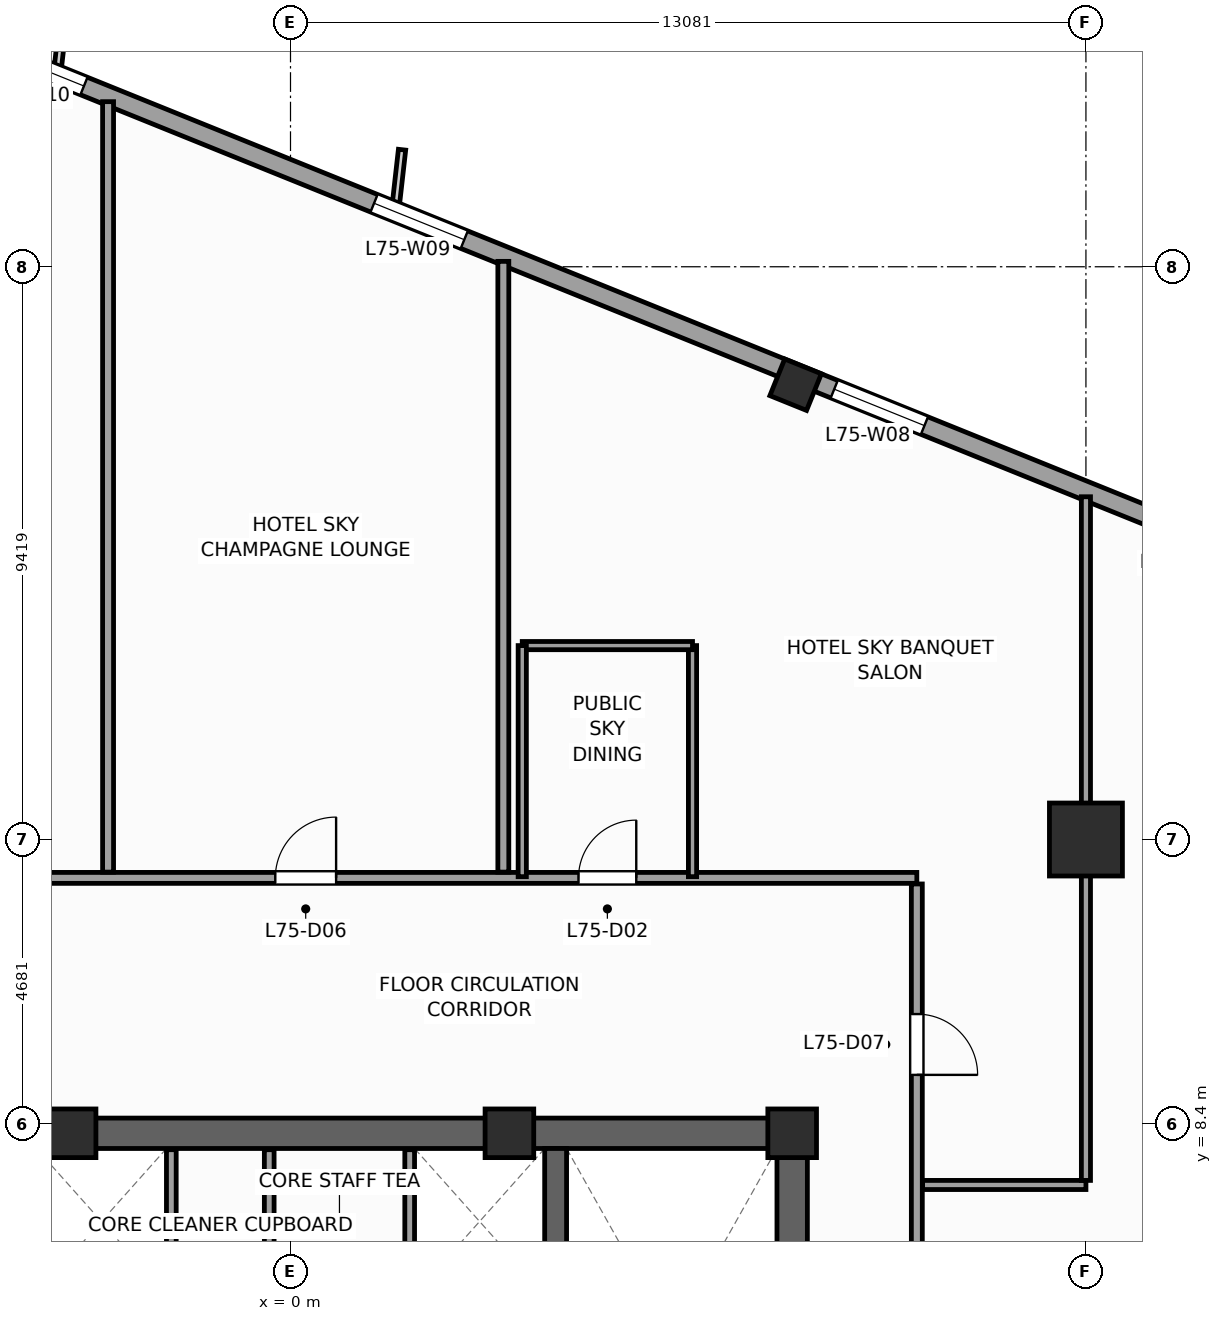
"""IFC4 building model, lengths in metres.
Left out: names, types, materials, properties, quantities, classifications, styles, units other than length and angle.
Written with IfcOpenShell. Run it as: python <this file> out.ifc"""

import sys

from ifc_helpers import new_model, si_unit, direction, frame, frame_2d, origin, origin_2d, place, context, subcontext, project, spatial, rectangle, extrude, source, transform, mapped, element, fill, save


model = new_model("IFC4")
c1 = context("Model", 3, precision=1e-05, world=origin(), true_north=direction((0.0, 1.0)))
c2 = subcontext(c1, "Body", "Model", "MODEL_VIEW")
j1 = project(units=[si_unit("LENGTHUNIT", "METRE"), si_unit("PLANEANGLEUNIT", "RADIAN")], contexts=[c1])
p1 = place(None, origin())
s1 = spatial("IfcSite", under=j1, at=p1, CompositionType="ELEMENT")
p2 = place(p1, origin())
s2 = spatial("IfcBuilding", under=s1, at=p2, CompositionType="ELEMENT")
p3 = place(p2, frame((0.0, 0.0, 304.8)))
s3 = spatial("IfcBuildingStorey", under=s2, at=p3, CompositionType="ELEMENT", Elevation=304.8)
p4 = place(p3, frame((-8.5, 8.25, 0.0), z_axis=(0.0, 0.0, 1.0), x_axis=(1.0, 0.0, 0.0)))
e1 = element("IfcWall", 1, at=p4, inside=s3, PredefinedType="SHEAR", context=c2, shape_type="SweptSolid", body=[
    extrude(rectangle(XDim=17.0, YDim=0.5, at=frame_2d((8.5, 0.0))), origin(), (0.0, 0.0, 1.0), 3.6),
])
p5 = place(p3, frame((8.25, -8.0, 0.0), z_axis=(0.0, 0.0, 1.0), x_axis=(0.0, 1.0, 0.0)))
e2 = element("IfcWall", 2, at=p5, inside=s3, PredefinedType="SHEAR", context=c2, shape_type="SweptSolid", body=[
    extrude(rectangle(XDim=16.0, YDim=0.5, at=frame_2d((8.0, 0.0))), origin(), (0.0, 0.0, 1.0), 3.6),
])
p6 = place(p5, frame((4.69, 0.0, 0.0)))
e3 = element("IfcOpeningElement", 3, at=p6, cuts=e2, PredefinedType="OPENING", context=c2, shape_type="SweptSolid", body=[
    extrude(rectangle(XDim=1.3, YDim=2.2, at=frame_2d((0.65, 1.1))), frame((0.0, 0.26, 0.0), z_axis=(0.0, -1.0, 0.0), x_axis=(1.0, 0.0, 0.0)), (0.0, 0.0, 1.0), 0.52),
])
p7 = place(p3, frame((4.36, -8.0, 0.0), z_axis=(0.0, 0.0, 1.0), x_axis=(0.0, 1.0, 0.0)))
e4 = element("IfcWall", 4, at=p7, inside=s3, PredefinedType="SHEAR", context=c2, shape_type="SweptSolid", body=[
    extrude(rectangle(XDim=16.0, YDim=0.36, at=frame_2d((8.0, 0.0))), origin(), (0.0, 0.0, 1.0), 3.6),
])
m1 = source(origin(), c2, "Body", "SweptSolid", [
    extrude(rectangle(XDim=0.8, YDim=0.8, at=origin_2d()), origin(), (0.0, 0.0, 1.0), 3.6),
])
for number, where, z_axis, x_axis in (
    (5, (8.25, 8.25, 0.0), (0.0, 0.0, 1.0), (1.0, 0.0, 0.0)),
    (6, (-3.6, 8.25, 0.0), (0.0, 0.0, 1.0), (1.0, 0.0, 0.0)),
    (7, (3.6, 8.25, 0.0), (0.0, 0.0, 1.0), (1.0, 0.0, 0.0)),
):
    element("IfcColumn", number, at=place(p3, frame(where, z_axis=z_axis, x_axis=x_axis)), inside=s3, PredefinedType="PILASTER", context=c2, shape_type="MappedRepresentation", body=[
        mapped(m1, transform((0.0, 0.0, 0.0), scale=1.0)),
    ])
m2 = source(origin(), c2, "Body", "SweptSolid", [
    extrude(rectangle(XDim=1.2, YDim=1.2, at=origin_2d()), origin(), (0.0, 0.0, 1.0), 3.6),
])
p8 = place(p3, frame((13.081, 13.081, 0.0), z_axis=(0.0, 0.0, 1.0), x_axis=(1.0, 0.0, 0.0)))
e8 = element("IfcColumn", 8, at=p8, inside=s3, PredefinedType="COLUMN", context=c2, shape_type="MappedRepresentation", body=[
    mapped(m2, transform((0.0, 0.0, 0.0), scale=1.0)),
])
m3 = source(origin(), c2, "Body", "SweptSolid", [
    extrude(rectangle(XDim=0.65, YDim=0.65, at=origin_2d()), origin(), (0.0, 0.0, 1.0), 3.6),
])
p9 = place(p3, frame((8.307, 20.56, 0.0), z_axis=(0.0, 0.0, 1.0), x_axis=(0.374606593416, 0.927183854567, 0.0)))
e9 = element("IfcColumn", 9, at=p9, inside=s3, PredefinedType="COLUMN", context=c2, shape_type="MappedRepresentation", body=[
    mapped(m3, transform((0.0, 0.0, 0.0), scale=1.0)),
])
p10 = place(p3, frame((23.813, 14.479, 0.0), z_axis=(0.0, 0.0, 1.0), x_axis=(-0.927182657188, 0.374609557019, 0.0)))
e10 = element("IfcWall", 10, at=p10, inside=s3, PredefinedType="STANDARD", context=c2, shape_type="SweptSolid", body=[
    extrude(rectangle(XDim=33.31, YDim=0.31, at=frame_2d((16.655, 0.0))), origin(), (0.0, 0.0, 1.0), 2.75),
])
p11 = place(p10, frame((3.197, 0.0, 0.47)))
e11 = element("IfcOpeningElement", 11, at=p11, cuts=e10, PredefinedType="OPENING", context=c2, shape_type="SweptSolid", body=[
    extrude(rectangle(XDim=1.6, YDim=2.1, at=frame_2d((0.8, 1.05))), frame((0.0, 0.165, 0.0), z_axis=(0.0, -1.0, 0.0), x_axis=(1.0, 0.0, 0.0)), (0.0, 0.0, 1.0), 0.33),
])
p12 = place(p10, frame((8.86, 0.0, 0.47)))
e12 = element("IfcOpeningElement", 12, at=p12, cuts=e10, PredefinedType="OPENING", context=c2, shape_type="SweptSolid", body=[
    extrude(rectangle(XDim=1.6, YDim=2.1, at=frame_2d((0.8, 1.05))), frame((0.0, 0.165, 0.0), z_axis=(0.0, -1.0, 0.0), x_axis=(1.0, 0.0, 0.0)), (0.0, 0.0, 1.0), 0.33),
])
p13 = place(p10, frame((14.439, 0.0, 0.47)))
e13 = element("IfcOpeningElement", 13, at=p13, cuts=e10, PredefinedType="OPENING", context=c2, shape_type="SweptSolid", body=[
    extrude(rectangle(XDim=1.6, YDim=2.1, at=frame_2d((0.8, 1.05))), frame((0.0, 0.165, 0.0), z_axis=(0.0, -1.0, 0.0), x_axis=(1.0, 0.0, 0.0)), (0.0, 0.0, 1.0), 0.33),
])
p14 = place(p10, frame((22.601, 0.0, 0.47)))
e14 = element("IfcOpeningElement", 14, at=p14, cuts=e10, PredefinedType="OPENING", context=c2, shape_type="SweptSolid", body=[
    extrude(rectangle(XDim=1.6, YDim=2.1, at=frame_2d((0.8, 1.05))), frame((0.0, 0.165, 0.0), z_axis=(0.0, -1.0, 0.0), x_axis=(1.0, 0.0, 0.0)), (0.0, 0.0, 1.0), 0.33),
])
p15 = place(p10, frame((29.347, 0.0, 0.47)))
e15 = element("IfcOpeningElement", 15, at=p15, cuts=e10, PredefinedType="OPENING", context=c2, shape_type="SweptSolid", body=[
    extrude(rectangle(XDim=1.6, YDim=2.1, at=frame_2d((0.8, 1.05))), frame((0.0, 0.165, 0.0), z_axis=(0.0, -1.0, 0.0), x_axis=(1.0, 0.0, 0.0)), (0.0, 0.0, 1.0), 0.33),
])
for number, where, z_axis, x_axis in (
    (16, (-1.96, 4.58, 0.0), (0.0, 0.0, 1.0), (0.0, 1.0, 0.0)),
    (17, (1.96, 4.58, 0.0), (0.0, 0.0, 1.0), (0.0, 1.0, 0.0)),
):
    element("IfcWall", number, at=place(p3, frame(where, z_axis=z_axis, x_axis=x_axis)), inside=s3, PredefinedType="PARTITIONING", context=c2, shape_type="SweptSolid", body=[
        extrude(rectangle(XDim=3.4, YDim=0.16, at=frame_2d((1.7, 0.0))), origin(), (0.0, 0.0, 1.0), 3.35),
    ])
p16 = place(p3, frame((-0.35, 4.6, 0.0), z_axis=(0.0, 0.0, 1.0), x_axis=(0.0, 1.0, 0.0)))
e18 = element("IfcWall", 18, at=p16, inside=s3, PredefinedType="PARTITIONING", context=c2, shape_type="SweptSolid", body=[
    extrude(rectangle(XDim=3.38, YDim=0.16, at=frame_2d((1.69, 0.0))), origin(), (0.0, 0.0, 1.0), 3.35),
])
p17 = place(p3, frame((-10.3, 12.45, 0.0), z_axis=(0.0, 0.0, 1.0), x_axis=(1.0, 0.0, 0.0)))
e19 = element("IfcWall", 19, at=p17, inside=s3, PredefinedType="PARTITIONING", context=c2, shape_type="SweptSolid", body=[
    extrude(rectangle(XDim=20.6, YDim=0.18, at=frame_2d((10.3, 0.0))), origin(), (0.0, 0.0, 1.0), 3.35),
])
p18 = place(p17, frame((15.036, 0.0, 0.0)))
e20 = element("IfcOpeningElement", 20, at=p18, cuts=e19, PredefinedType="OPENING", context=c2, shape_type="SweptSolid", body=[
    extrude(rectangle(XDim=0.95, YDim=2.1, at=frame_2d((0.475, 1.05))), frame((0.0, 0.1, 0.0), z_axis=(0.0, -1.0, 0.0), x_axis=(1.0, 0.0, 0.0)), (0.0, 0.0, 1.0), 0.2),
])
p19 = place(p17, frame((3.314, 0.0, 0.0)))
e21 = element("IfcOpeningElement", 21, at=p19, cuts=e19, PredefinedType="OPENING", context=c2, shape_type="SweptSolid", body=[
    extrude(rectangle(XDim=1.0, YDim=2.15, at=frame_2d((0.5, 1.075))), frame((0.0, 0.1, 0.0), z_axis=(0.0, -1.0, 0.0), x_axis=(1.0, 0.0, 0.0)), (0.0, 0.0, 1.0), 0.2),
])
p20 = place(p17, frame((10.05, 0.0, 0.0)))
e22 = element("IfcOpeningElement", 22, at=p20, cuts=e19, PredefinedType="OPENING", context=c2, shape_type="SweptSolid", body=[
    extrude(rectangle(XDim=1.0, YDim=2.15, at=frame_2d((0.5, 1.075))), frame((0.0, 0.1, 0.0), z_axis=(0.0, -1.0, 0.0), x_axis=(1.0, 0.0, 0.0)), (0.0, 0.0, 1.0), 0.2),
])
p21 = place(p3, frame((10.3, -12.35, 0.0), z_axis=(0.0, 0.0, 1.0), x_axis=(0.0, 1.0, 0.0)))
e23 = element("IfcWall", 23, at=p21, inside=s3, PredefinedType="PARTITIONING", context=c2, shape_type="SweptSolid", body=[
    extrude(rectangle(XDim=24.7, YDim=0.18, at=frame_2d((12.35, 0.0))), origin(), (0.0, 0.0, 1.0), 3.35),
])
p22 = place(p21, frame((21.561, 0.0, 0.0)))
e24 = element("IfcOpeningElement", 24, at=p22, cuts=e23, PredefinedType="OPENING", context=c2, shape_type="SweptSolid", body=[
    extrude(rectangle(XDim=1.0, YDim=2.15, at=frame_2d((0.5, 1.075))), frame((0.0, 0.1, 0.0), z_axis=(0.0, -1.0, 0.0), x_axis=(1.0, 0.0, 0.0)), (0.0, 0.0, 1.0), 0.2),
])
p23 = place(p21, frame((16.8, 0.0, 0.0)))
e25 = element("IfcOpeningElement", 25, at=p23, cuts=e23, PredefinedType="OPENING", context=c2, shape_type="SweptSolid", body=[
    extrude(rectangle(XDim=1.0, YDim=2.15, at=frame_2d((0.5, 1.075))), frame((0.0, 0.1, 0.0), z_axis=(0.0, -1.0, 0.0), x_axis=(1.0, 0.0, 0.0)), (0.0, 0.0, 1.0), 0.2),
])
p24 = place(p21, frame((11.85, 0.0, 0.0)))
e26 = element("IfcOpeningElement", 26, at=p24, cuts=e23, PredefinedType="OPENING", context=c2, shape_type="SweptSolid", body=[
    extrude(rectangle(XDim=1.0, YDim=2.15, at=frame_2d((0.5, 1.075))), frame((0.0, 0.1, 0.0), z_axis=(0.0, -1.0, 0.0), x_axis=(1.0, 0.0, 0.0)), (0.0, 0.0, 1.0), 0.2),
])
p25 = place(p21, frame((6.9, 0.0, 0.0)))
e27 = element("IfcOpeningElement", 27, at=p25, cuts=e23, PredefinedType="OPENING", context=c2, shape_type="SweptSolid", body=[
    extrude(rectangle(XDim=1.0, YDim=2.15, at=frame_2d((0.5, 1.075))), frame((0.0, 0.1, 0.0), z_axis=(0.0, -1.0, 0.0), x_axis=(1.0, 0.0, 0.0)), (0.0, 0.0, 1.0), 0.2),
])
p26 = place(p3, frame((-3.0, 12.545, 0.0), z_axis=(0.0, 0.0, 1.0), x_axis=(0.0, 1.0, 0.0)))
e28 = element("IfcWall", 28, at=p26, inside=s3, PredefinedType="PARTITIONING", context=c2, shape_type="SweptSolid", body=[
    extrude(rectangle(XDim=12.67, YDim=0.18, at=frame_2d((6.335, 0.0))), origin(), (0.0, 0.0, 1.0), 3.02),
])
p27 = place(p3, frame((3.5, 12.545, 0.0), z_axis=(0.0, 0.0, 1.0), x_axis=(0.0, 1.0, 0.0)))
e29 = element("IfcWall", 29, at=p27, inside=s3, PredefinedType="PARTITIONING", context=c2, shape_type="SweptSolid", body=[
    extrude(rectangle(XDim=10.044, YDim=0.18, at=frame_2d((5.022, 0.0))), origin(), (0.0, 0.0, 1.0), 3.02),
])
p28 = place(p3, frame((10.395, 7.4, 0.0), z_axis=(0.0, 0.0, 1.0), x_axis=(1.0, 0.0, 0.0)))
e30 = element("IfcWall", 30, at=p28, inside=s3, PredefinedType="PARTITIONING", context=c2, shape_type="SweptSolid", body=[
    extrude(rectangle(XDim=2.686, YDim=0.15, at=frame_2d((1.343, 0.0))), origin(), (0.0, 0.0, 1.0), 3.35),
])
p29 = place(p3, frame((13.081, 7.475, 0.0), z_axis=(0.0, 0.0, 1.0), x_axis=(0.0, 1.0, 0.0)))
e31 = element("IfcWall", 31, at=p29, inside=s3, PredefinedType="PARTITIONING", context=c2, shape_type="SweptSolid", body=[
    extrude(rectangle(XDim=11.243, YDim=0.15, at=frame_2d((5.621, 0.0))), origin(), (0.0, 0.0, 1.0), 2.45),
])
p30 = place(p3, frame((6.611, 12.47, 0.0), z_axis=(0.0, 0.0, 1.0), x_axis=(0.0, 1.0, 0.0)))
e32 = element("IfcWall", 32, at=p30, inside=s3, PredefinedType="PARTITIONING", context=c2, shape_type="SweptSolid", body=[
    extrude(rectangle(XDim=3.8, YDim=0.135, at=frame_2d((1.9, 0.0))), origin(), (0.0, 0.0, 1.0), 3.35),
])
p31 = place(p3, frame((3.811, 16.27, 0.0), z_axis=(0.0, 0.0, 1.0), x_axis=(1.0, 0.0, 0.0)))
e33 = element("IfcWall", 33, at=p31, inside=s3, PredefinedType="PARTITIONING", context=c2, shape_type="SweptSolid", body=[
    extrude(rectangle(XDim=2.8, YDim=0.135, at=frame_2d((1.4, 0.0))), origin(), (0.0, 0.0, 1.0), 2.95),
])
p32 = place(p3, frame((3.811, 12.47, 0.0), z_axis=(0.0, 0.0, 1.0), x_axis=(0.0, 1.0, 0.0)))
e34 = element("IfcWall", 34, at=p32, inside=s3, PredefinedType="PARTITIONING", context=c2, shape_type="SweptSolid", body=[
    extrude(rectangle(XDim=3.8, YDim=0.135, at=frame_2d((1.9, 0.0))), origin(), (0.0, 0.0, 1.0), 3.35),
])
m4 = source(origin(), c2, "Body", "SweptSolid", [
    extrude(rectangle(XDim=1.6, YDim=2.1, at=frame_2d((0.8, 1.05))), frame((0.0, 0.03, 0.0), z_axis=(0.0, -1.0, 0.0), x_axis=(1.0, 0.0, 0.0)), (0.0, 0.0, 1.0), 0.06),
])
p33 = place(p13, origin())
e35 = element("IfcWindow", 35, at=p33, inside=s3, PartitioningType="SINGLE_PANEL", PredefinedType="WINDOW", context=c2, shape_type="MappedRepresentation", body=[
    mapped(m4, transform((0.0, 0.0, 0.0), scale=1.0)),
])
fill(e13, e35)
p34 = place(p14, origin())
e36 = element("IfcWindow", 36, at=p34, inside=s3, PartitioningType="SINGLE_PANEL", PredefinedType="WINDOW", context=c2, shape_type="MappedRepresentation", body=[
    mapped(m4, transform((0.0, 0.0, 0.0), scale=1.0)),
])
fill(e14, e36)
p35 = place(p15, origin())
e37 = element("IfcWindow", 37, at=p35, inside=s3, PartitioningType="SINGLE_PANEL", PredefinedType="WINDOW", context=c2, shape_type="MappedRepresentation", body=[
    mapped(m4, transform((0.0, 0.0, 0.0), scale=1.0)),
])
fill(e15, e37)
m5 = source(origin(), c2, "Body", "SweptSolid", [
    extrude(rectangle(XDim=0.95, YDim=2.1, at=frame_2d((0.475, 1.05))), frame((0.0, 0.025, 0.0), z_axis=(0.0, -1.0, 0.0), x_axis=(1.0, 0.0, 0.0)), (0.0, 0.0, 1.0), 0.05),
])
p36 = place(p18, origin())
e38 = element("IfcDoor", 38, at=p36, inside=s3, OperationType="SINGLE_SWING_RIGHT", PredefinedType="DOOR", context=c2, shape_type="MappedRepresentation", body=[
    mapped(m5, transform((0.0, 0.0, 0.0), scale=1.0)),
])
fill(e20, e38)
m6 = source(origin(), c2, "Body", "SweptSolid", [
    extrude(rectangle(XDim=1.0, YDim=2.15, at=frame_2d((0.5, 1.075))), frame((0.0, 0.025, 0.0), z_axis=(0.0, -1.0, 0.0), x_axis=(1.0, 0.0, 0.0)), (0.0, 0.0, 1.0), 0.05),
])
p37 = place(p20, origin())
e39 = element("IfcDoor", 39, at=p37, inside=s3, OperationType="SINGLE_SWING_RIGHT", PredefinedType="DOOR", context=c2, shape_type="MappedRepresentation", body=[
    mapped(m6, transform((0.0, 0.0, 0.0), scale=1.0)),
])
fill(e22, e39)
p38 = place(p22, frame((1.0, 0.0, 0.0), z_axis=(0.0, 0.0, 1.0), x_axis=(-1.0, 0.0, 0.0)))
e40 = element("IfcDoor", 40, at=p38, inside=s3, OperationType="SINGLE_SWING_LEFT", PredefinedType="DOOR", context=c2, shape_type="MappedRepresentation", body=[
    mapped(m6, transform((0.0, 0.0, 0.0), scale=1.0)),
])
fill(e24, e40)
save(model, sys.argv[1])
